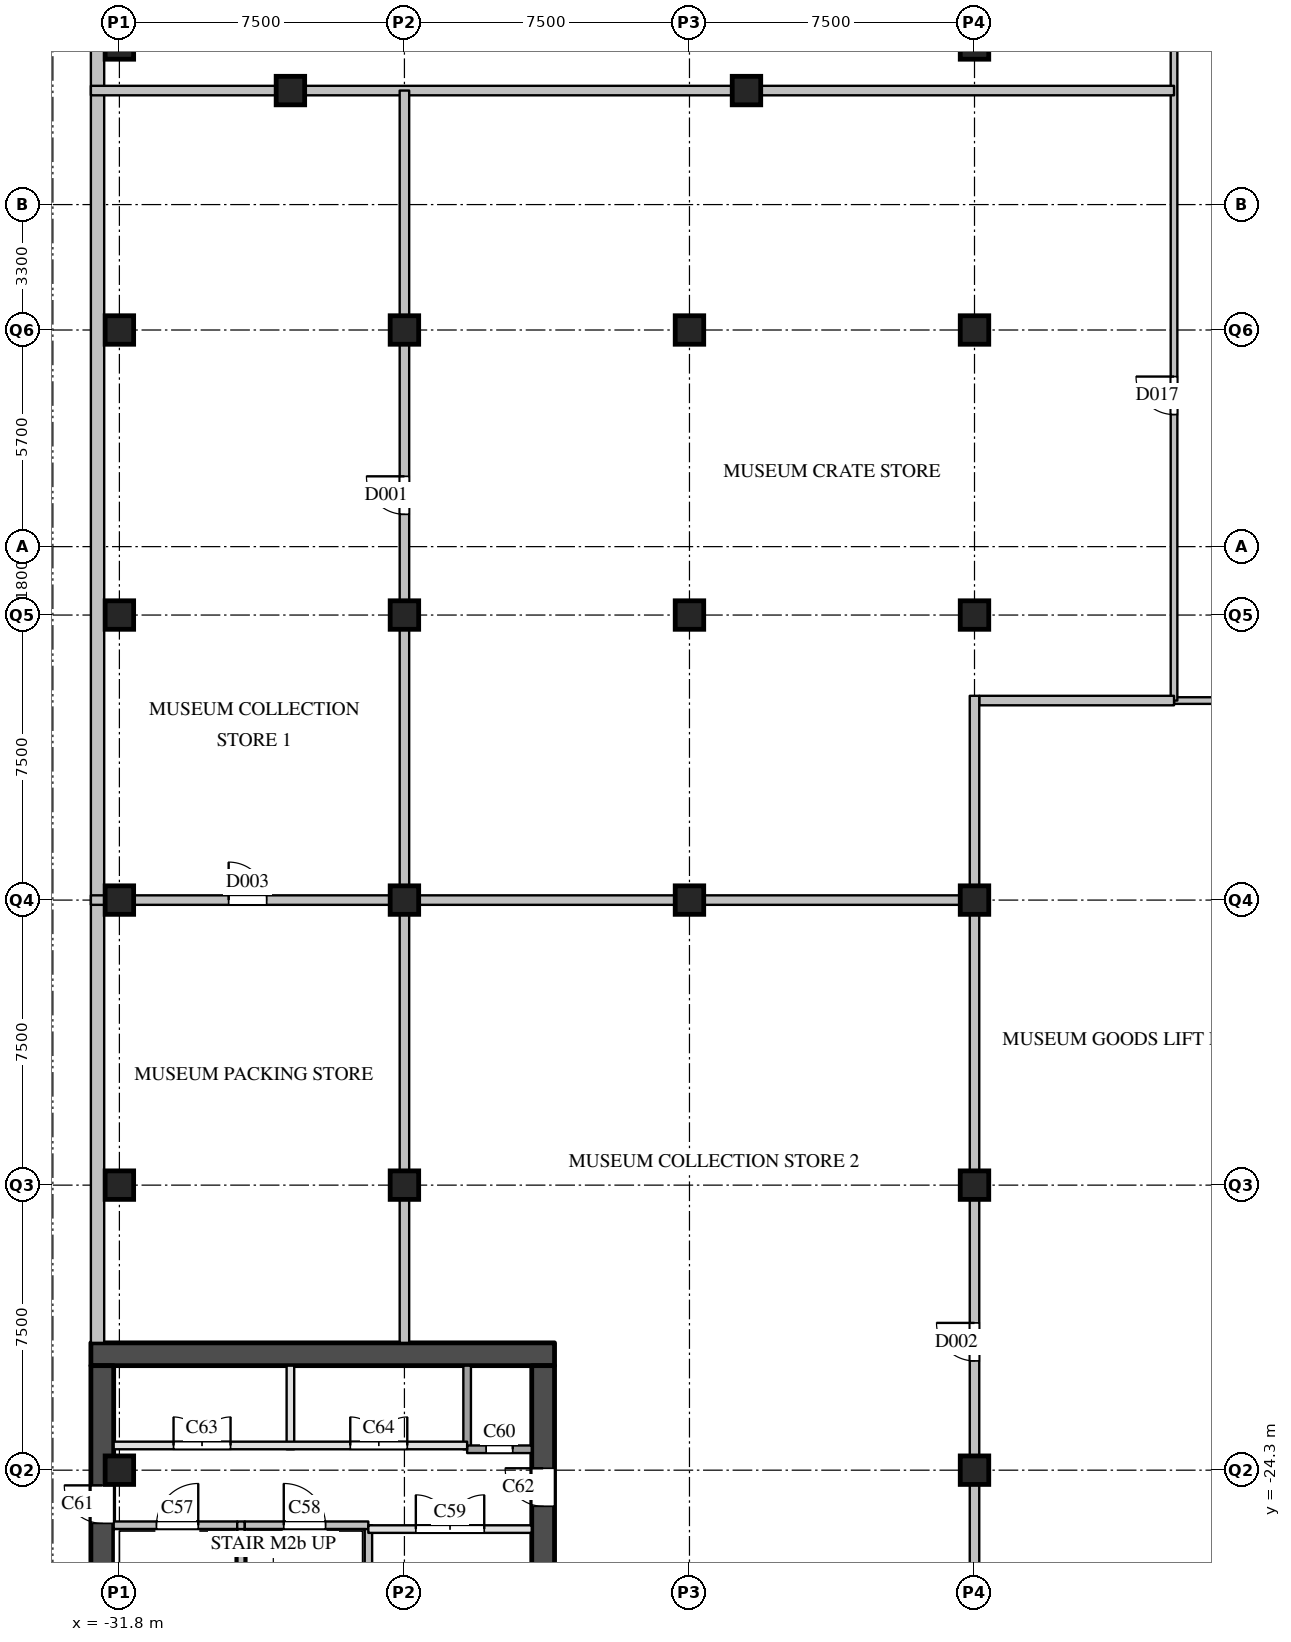
"""IFC4 building model, lengths in metres.
Left out: names, types, materials, properties, quantities, classifications, styles, units other than length and angle.
Written with IfcOpenShell. Run it as: python <this file> out.ifc"""

import sys

from ifc_helpers import new_model, si_unit, direction, frame, frame_2d, origin, origin_2d, place, context, subcontext, project, spatial, rectangle, extrude, element, fill, save


model = new_model("IFC4")
c1 = context("Model", 3, precision=1e-05, world=origin(), true_north=direction((0.0, 1.0)))
c2 = subcontext(c1, "Body", "Model", "MODEL_VIEW")
j1 = project(units=[si_unit("LENGTHUNIT", "METRE"), si_unit("PLANEANGLEUNIT", "RADIAN")], contexts=[c1])
p1 = place(None, origin())
s1 = spatial("IfcSite", under=j1, at=p1, CompositionType="ELEMENT")
p2 = place(p1, origin())
s2 = spatial("IfcBuilding", under=s1, at=p2, CompositionType="ELEMENT")
p3 = place(p2, frame((0.0, 0.0, -6.0)))
s3 = spatial("IfcBuildingStorey", under=s2, at=p3, CompositionType="ELEMENT", Elevation=-6.0)
p4 = place(p3, frame((-32.375, -20.95, 0.0), z_axis=(0.0, 0.0, 1.0), x_axis=(0.0, 1.0, 0.0)))
e1 = element("IfcWall", 1, at=p4, inside=s3, PredefinedType="SOLIDWALL", context=c2, shape_type="SweptSolid", body=[
    extrude(rectangle(XDim=68.3, YDim=0.35, at=frame_2d((34.15, 0.0))), origin(), (0.0, 0.0, 1.0), 5.59),
])
for number, where, z_axis, x_axis in (
    (2, (-31.8, -24.3, 0.0), (0.0, 0.0, 1.0), (1.0, 0.0, 0.0)),
    (3, (-31.8, -16.8, 0.0), (0.0, 0.0, 1.0), (1.0, 0.0, 0.0)),
    (4, (-31.8, -9.3, 0.0), (0.0, 0.0, 1.0), (1.0, 0.0, 0.0)),
    (5, (-31.8, -1.8, 0.0), (0.0, 0.0, 1.0), (1.0, 0.0, 0.0)),
    (6, (-31.8, 5.7, 0.0), (0.0, 0.0, 1.0), (1.0, 0.0, 0.0)),
    (7, (-31.8, 13.2, 0.0), (0.0, 0.0, 1.0), (1.0, 0.0, 0.0)),
    (8, (-24.3, -16.8, 0.0), (0.0, 0.0, 1.0), (1.0, 0.0, 0.0)),
    (9, (-24.3, -9.3, 0.0), (0.0, 0.0, 1.0), (1.0, 0.0, 0.0)),
    (10, (-24.3, -1.8, 0.0), (0.0, 0.0, 1.0), (1.0, 0.0, 0.0)),
    (11, (-24.3, 5.7, 0.0), (0.0, 0.0, 1.0), (1.0, 0.0, 0.0)),
    (12, (-16.8, -9.3, 0.0), (0.0, 0.0, 1.0), (1.0, 0.0, 0.0)),
    (13, (-16.8, -1.8, 0.0), (0.0, 0.0, 1.0), (1.0, 0.0, 0.0)),
    (14, (-16.8, 5.7, 0.0), (0.0, 0.0, 1.0), (1.0, 0.0, 0.0)),
    (15, (-9.3, -24.3, 0.0), (0.0, 0.0, 1.0), (1.0, 0.0, 0.0)),
    (16, (-9.3, -16.8, 0.0), (0.0, 0.0, 1.0), (1.0, 0.0, 0.0)),
    (17, (-9.3, -9.3, 0.0), (0.0, 0.0, 1.0), (1.0, 0.0, 0.0)),
    (18, (-9.3, -1.8, 0.0), (0.0, 0.0, 1.0), (1.0, 0.0, 0.0)),
    (19, (-9.3, 5.7, 0.0), (0.0, 0.0, 1.0), (1.0, 0.0, 0.0)),
    (20, (-9.3, 13.2, 0.0), (0.0, 0.0, 1.0), (1.0, 0.0, 0.0)),
    (21, (-27.3, 12.0, 0.0), (0.0, 0.0, 1.0), (1.0, 0.0, 0.0)),
    (22, (-15.3, 12.0, 0.0), (0.0, 0.0, 1.0), (1.0, 0.0, 0.0)),
):
    element("IfcColumn", number, at=place(p3, frame(where, z_axis=z_axis, x_axis=x_axis)), inside=s3, PredefinedType="COLUMN", context=c2, shape_type="SweptSolid", body=[
        extrude(rectangle(XDim=0.75, YDim=0.75, at=origin_2d()), origin(), (0.0, 0.0, 1.0), 6.0),
    ])
p5 = place(p3, frame((-32.55, -21.25, 0.0), z_axis=(0.0, 0.0, 1.0), x_axis=(1.0, 0.0, 0.0)))
e23 = element("IfcWall", 23, at=p5, inside=s3, PredefinedType="SHEAR", context=c2, shape_type="SweptSolid", body=[
    extrude(rectangle(XDim=12.2, YDim=0.6, at=frame_2d((6.1, 0.0))), origin(), (0.0, 0.0, 1.0), 5.59),
])
p6 = place(p3, frame((-32.25, -31.95, 0.0), z_axis=(0.0, 0.0, 1.0), x_axis=(0.0, 1.0, 0.0)))
e24 = element("IfcWall", 24, at=p6, inside=s3, PredefinedType="SHEAR", context=c2, shape_type="SweptSolid", body=[
    extrude(rectangle(XDim=10.4, YDim=0.6, at=frame_2d((5.2, 0.0))), origin(), (0.0, 0.0, 1.0), 5.59),
])
p7 = place(p6, frame((6.25, 0.0, 0.0)))
e25 = element("IfcOpeningElement", 25, at=p7, cuts=e24, PredefinedType="OPENING", context=c2, shape_type="SweptSolid", body=[
    extrude(rectangle(XDim=1.0, YDim=2.1, at=frame_2d((0.5, 1.05))), frame((0.0, 0.31, 0.0), z_axis=(0.0, -1.0, 0.0), x_axis=(1.0, 0.0, 0.0)), (0.0, 0.0, 1.0), 0.62),
])
p8 = place(p3, frame((-20.65, -31.95, 0.0), z_axis=(0.0, 0.0, 1.0), x_axis=(0.0, 1.0, 0.0)))
e26 = element("IfcWall", 26, at=p8, inside=s3, PredefinedType="SHEAR", context=c2, shape_type="SweptSolid", body=[
    extrude(rectangle(XDim=10.4, YDim=0.6, at=frame_2d((5.2, 0.0))), origin(), (0.0, 0.0, 1.0), 5.59),
])
p9 = place(p8, frame((6.7, 0.0, 0.0)))
e27 = element("IfcOpeningElement", 27, at=p9, cuts=e26, PredefinedType="OPENING", context=c2, shape_type="SweptSolid", body=[
    extrude(rectangle(XDim=1.0, YDim=2.1, at=frame_2d((0.5, 1.05))), frame((0.0, 0.31, 0.0), z_axis=(0.0, -1.0, 0.0), x_axis=(1.0, 0.0, 0.0)), (0.0, 0.0, 1.0), 0.62),
])
p10 = place(p3, frame((-28.6, -27.35, 0.0), z_axis=(0.0, 0.0, 1.0), x_axis=(0.0, 1.0, 0.0)))
e28 = element("IfcWall", 28, at=p10, inside=s3, PredefinedType="SOLIDWALL", context=c2, shape_type="SweptSolid", body=[
    extrude(rectangle(XDim=1.6, YDim=0.2, at=frame_2d((0.8, 0.0))), origin(), (0.0, 0.0, 1.0), 5.59),
])
p11 = place(p3, frame((-27.3, -23.75, 0.0), z_axis=(0.0, 0.0, 1.0), x_axis=(0.0, 1.0, 0.0)))
e29 = element("IfcWall", 29, at=p11, inside=s3, PredefinedType="PARTITIONING", context=c2, shape_type="SweptSolid", body=[
    extrude(rectangle(XDim=2.2, YDim=0.2, at=frame_2d((1.1, 0.0))), origin(), (0.0, 0.0, 1.0), 5.59),
])
p12 = place(p3, frame((-25.25, -27.35, 0.0), z_axis=(0.0, 0.0, 1.0), x_axis=(0.0, 1.0, 0.0)))
e30 = element("IfcWall", 30, at=p12, inside=s3, PredefinedType="SOLIDWALL", context=c2, shape_type="SweptSolid", body=[
    extrude(rectangle(XDim=1.6, YDim=0.2, at=frame_2d((0.8, 0.0))), origin(), (0.0, 0.0, 1.0), 5.59),
])
p13 = place(p3, frame((-22.65, -23.75, 0.0), z_axis=(0.0, 0.0, 1.0), x_axis=(0.0, 1.0, 0.0)))
e31 = element("IfcWall", 31, at=p13, inside=s3, PredefinedType="SOLIDWALL", context=c2, shape_type="SweptSolid", body=[
    extrude(rectangle(XDim=2.2, YDim=0.2, at=frame_2d((1.1, 0.0))), origin(), (0.0, 0.0, 1.0), 5.59),
])
p14 = place(p3, frame((-25.25, -25.85, 0.0), z_axis=(0.0, 0.0, 1.0), x_axis=(1.0, 0.0, 0.0)))
e32 = element("IfcWall", 32, at=p14, inside=s3, PredefinedType="PARTITIONING", context=c2, shape_type="SweptSolid", body=[
    extrude(rectangle(XDim=4.3, YDim=0.2, at=frame_2d((2.15, 0.0))), origin(), (0.0, 0.0, 1.0), 5.59),
])
p15 = place(p14, frame((1.25, 0.0, 0.0)))
e33 = element("IfcOpeningElement", 33, at=p15, cuts=e32, PredefinedType="OPENING", context=c2, shape_type="SweptSolid", body=[
    extrude(rectangle(XDim=1.8, YDim=2.1, at=frame_2d((0.9, 1.05))), frame((0.0, 0.11, 0.0), z_axis=(0.0, -1.0, 0.0), x_axis=(1.0, 0.0, 0.0)), (0.0, 0.0, 1.0), 0.22),
])
p16 = place(p3, frame((-31.95, -25.75, 0.0), z_axis=(0.0, 0.0, 1.0), x_axis=(1.0, 0.0, 0.0)))
e34 = element("IfcWall", 34, at=p16, inside=s3, PredefinedType="SOLIDWALL", context=c2, shape_type="SweptSolid", body=[
    extrude(rectangle(XDim=3.25, YDim=0.2, at=frame_2d((1.625, 0.0))), origin(), (0.0, 0.0, 1.0), 5.59),
])
p17 = place(p16, frame((1.125, 0.0, 0.0)))
e35 = element("IfcOpeningElement", 35, at=p17, cuts=e34, PredefinedType="OPENING", context=c2, shape_type="SweptSolid", body=[
    extrude(rectangle(XDim=1.1, YDim=2.1, at=frame_2d((0.55, 1.05))), frame((0.0, 0.11, 0.0), z_axis=(0.0, -1.0, 0.0), x_axis=(1.0, 0.0, 0.0)), (0.0, 0.0, 1.0), 0.22),
])
p18 = place(p3, frame((-28.7, -25.75, 0.0), z_axis=(0.0, 0.0, 1.0), x_axis=(1.0, 0.0, 0.0)))
e36 = element("IfcWall", 36, at=p18, inside=s3, PredefinedType="SOLIDWALL", context=c2, shape_type="SweptSolid", body=[
    extrude(rectangle(XDim=0.2, YDim=0.2, at=frame_2d((0.1, 0.0))), origin(), (0.0, 0.0, 1.0), 5.59),
])
p19 = place(p3, frame((-28.5, -25.75, 0.0), z_axis=(0.0, 0.0, 1.0), x_axis=(1.0, 0.0, 0.0)))
e37 = element("IfcWall", 37, at=p19, inside=s3, PredefinedType="SOLIDWALL", context=c2, shape_type="SweptSolid", body=[
    extrude(rectangle(XDim=3.25, YDim=0.2, at=frame_2d((1.625, 0.0))), origin(), (0.0, 0.0, 1.0), 5.59),
])
p20 = place(p19, frame((1.025, 0.0, 0.0)))
e38 = element("IfcOpeningElement", 38, at=p20, cuts=e37, PredefinedType="OPENING", context=c2, shape_type="SweptSolid", body=[
    extrude(rectangle(XDim=1.1, YDim=2.1, at=frame_2d((0.55, 1.05))), frame((0.0, 0.11, 0.0), z_axis=(0.0, -1.0, 0.0), x_axis=(1.0, 0.0, 0.0)), (0.0, 0.0, 1.0), 0.22),
])
p21 = place(p3, frame((-31.95, -23.65, 0.0), z_axis=(0.0, 0.0, 1.0), x_axis=(1.0, 0.0, 0.0)))
e39 = element("IfcWall", 39, at=p21, inside=s3, PredefinedType="PARTITIONING", context=c2, shape_type="SweptSolid", body=[
    extrude(rectangle(XDim=9.3, YDim=0.2, at=frame_2d((4.65, 0.0))), origin(), (0.0, 0.0, 1.0), 5.59),
])
p22 = place(p21, frame((1.575, 0.0, 0.0)))
e40 = element("IfcOpeningElement", 40, at=p22, cuts=e39, PredefinedType="OPENING", context=c2, shape_type="SweptSolid", body=[
    extrude(rectangle(XDim=1.5, YDim=2.1, at=frame_2d((0.75, 1.05))), frame((0.0, 0.11, 0.0), z_axis=(0.0, -1.0, 0.0), x_axis=(1.0, 0.0, 0.0)), (0.0, 0.0, 1.0), 0.22),
])
p23 = place(p21, frame((6.225, 0.0, 0.0)))
e41 = element("IfcOpeningElement", 41, at=p23, cuts=e39, PredefinedType="OPENING", context=c2, shape_type="SweptSolid", body=[
    extrude(rectangle(XDim=1.5, YDim=2.1, at=frame_2d((0.75, 1.05))), frame((0.0, 0.11, 0.0), z_axis=(0.0, -1.0, 0.0), x_axis=(1.0, 0.0, 0.0)), (0.0, 0.0, 1.0), 0.22),
])
p24 = place(p3, frame((-22.65, -23.75, 0.0), z_axis=(0.0, 0.0, 1.0), x_axis=(1.0, 0.0, 0.0)))
e42 = element("IfcWall", 42, at=p24, inside=s3, PredefinedType="SOLIDWALL", context=c2, shape_type="SweptSolid", body=[
    extrude(rectangle(XDim=1.7, YDim=0.2, at=frame_2d((0.85, 0.0))), origin(), (0.0, 0.0, 1.0), 5.59),
])
p25 = place(p24, frame((0.5, 0.0, 0.0)))
e43 = element("IfcOpeningElement", 43, at=p25, cuts=e42, PredefinedType="OPENING", context=c2, shape_type="SweptSolid", body=[
    extrude(rectangle(XDim=0.7, YDim=2.1, at=frame_2d((0.35, 1.05))), frame((0.0, 0.11, 0.0), z_axis=(0.0, -1.0, 0.0), x_axis=(1.0, 0.0, 0.0)), (0.0, 0.0, 1.0), 0.22),
])
p26 = place(p3, frame((-4.05, -4.05, 0.0), z_axis=(0.0, 0.0, 1.0), x_axis=(1.0, 0.0, 0.0)))
e44 = element("IfcWall", 44, at=p26, inside=s3, PredefinedType="PARTITIONING", context=c2, shape_type="SweptSolid", body=[
    extrude(rectangle(XDim=18.0, YDim=0.175, at=frame_2d((9.0, 0.0))), origin(), (0.0, 0.0, 1.0), 4.79),
])
p27 = place(p26, frame((8.5, 0.0, 0.0)))
e45 = element("IfcOpeningElement", 45, at=p27, cuts=e44, PredefinedType="OPENING", context=c2, shape_type="SweptSolid", body=[
    extrude(rectangle(XDim=1.0, YDim=2.1, at=frame_2d((0.5, 1.05))), frame((0.0, 0.097, 0.0), z_axis=(0.0, -1.0, 0.0), x_axis=(1.0, 0.0, 0.0)), (0.0, 0.0, 1.0), 0.195),
])
p28 = place(p3, frame((-4.05, -4.05, 0.0), z_axis=(0.0, 0.0, 1.0), x_axis=(0.0, 1.0, 0.0)))
e46 = element("IfcWall", 46, at=p28, inside=s3, PredefinedType="PARTITIONING", context=c2, shape_type="SweptSolid", body=[
    extrude(rectangle(XDim=34.05, YDim=0.175, at=frame_2d((17.025, 0.0))), origin(), (0.0, 0.0, 1.0), 4.79),
])
p29 = place(p28, frame((24.55, 0.0, 0.0)))
e47 = element("IfcOpeningElement", 47, at=p29, cuts=e46, PredefinedType="OPENING", context=c2, shape_type="SweptSolid", body=[
    extrude(rectangle(XDim=1.0, YDim=2.1, at=frame_2d((0.5, 1.05))), frame((0.0, 0.097, 0.0), z_axis=(0.0, -1.0, 0.0), x_axis=(1.0, 0.0, 0.0)), (0.0, 0.0, 1.0), 0.195),
])
p30 = place(p28, frame((7.525, 0.0, 0.0)))
e48 = element("IfcOpeningElement", 48, at=p30, cuts=e46, PredefinedType="OPENING", context=c2, shape_type="SweptSolid", body=[
    extrude(rectangle(XDim=1.0, YDim=2.1, at=frame_2d((0.5, 1.05))), frame((0.0, 0.097, 0.0), z_axis=(0.0, -1.0, 0.0), x_axis=(1.0, 0.0, 0.0)), (0.0, 0.0, 1.0), 0.195),
])
p31 = place(p3, frame((-32.55, -9.3, 0.0), z_axis=(0.0, 0.0, 1.0), x_axis=(1.0, 0.0, 0.0)))
e49 = element("IfcWall", 49, at=p31, inside=s3, PredefinedType="PARTITIONING", context=c2, shape_type="SweptSolid", body=[
    extrude(rectangle(XDim=23.25, YDim=0.25, at=frame_2d((11.625, 0.0))), origin(), (0.0, 0.0, 1.0), 4.79),
])
p32 = place(p31, frame((3.625, 0.0, 0.0)))
e50 = element("IfcOpeningElement", 50, at=p32, cuts=e49, PredefinedType="OPENING", context=c2, shape_type="SweptSolid", body=[
    extrude(rectangle(XDim=1.0, YDim=2.1, at=frame_2d((0.5, 1.05))), frame((0.0, 0.135, 0.0), z_axis=(0.0, -1.0, 0.0), x_axis=(1.0, 0.0, 0.0)), (0.0, 0.0, 1.0), 0.27),
])
p33 = place(p3, frame((-9.175, -4.05, 0.0), z_axis=(0.0, 0.0, 1.0), x_axis=(1.0, 0.0, 0.0)))
e51 = element("IfcWall", 51, at=p33, inside=s3, PredefinedType="PARTITIONING", context=c2, shape_type="SweptSolid", body=[
    extrude(rectangle(XDim=5.125, YDim=0.25, at=frame_2d((2.562, 0.0))), origin(), (0.0, 0.0, 1.0), 4.79),
])
p34 = place(p3, frame((-32.55, 12.0, 0.0), z_axis=(0.0, 0.0, 1.0), x_axis=(1.0, 0.0, 0.0)))
e52 = element("IfcWall", 52, at=p34, inside=s3, PredefinedType="PARTITIONING", context=c2, shape_type="SweptSolid", body=[
    extrude(rectangle(XDim=28.5, YDim=0.25, at=frame_2d((14.25, 0.0))), origin(), (0.0, 0.0, 1.0), 4.79),
])
p35 = place(p3, frame((-24.3, -20.95, 0.0), z_axis=(0.0, 0.0, 1.0), x_axis=(0.0, 1.0, 0.0)))
e53 = element("IfcWall", 53, at=p35, inside=s3, PredefinedType="PARTITIONING", context=c2, shape_type="SweptSolid", body=[
    extrude(rectangle(XDim=32.95, YDim=0.25, at=frame_2d((16.475, 0.0))), origin(), (0.0, 0.0, 1.0), 4.79),
])
p36 = place(p35, frame((21.8, 0.0, 0.0)))
e54 = element("IfcOpeningElement", 54, at=p36, cuts=e53, PredefinedType="OPENING", context=c2, shape_type="SweptSolid", body=[
    extrude(rectangle(XDim=1.0, YDim=2.1, at=frame_2d((0.5, 1.05))), frame((0.0, 0.135, 0.0), z_axis=(0.0, -1.0, 0.0), x_axis=(1.0, 0.0, 0.0)), (0.0, 0.0, 1.0), 0.27),
])
p37 = place(p3, frame((-9.3, -32.55, 0.0), z_axis=(0.0, 0.0, 1.0), x_axis=(0.0, 1.0, 0.0)))
e55 = element("IfcWall", 55, at=p37, inside=s3, PredefinedType="PARTITIONING", context=c2, shape_type="SweptSolid", body=[
    extrude(rectangle(XDim=28.625, YDim=0.25, at=frame_2d((14.312, 0.0))), origin(), (0.0, 0.0, 1.0), 4.79),
])
p38 = place(p37, frame((11.125, 0.0, 0.0)))
e56 = element("IfcOpeningElement", 56, at=p38, cuts=e55, PredefinedType="OPENING", context=c2, shape_type="SweptSolid", body=[
    extrude(rectangle(XDim=1.0, YDim=2.1, at=frame_2d((0.5, 1.05))), frame((0.0, 0.135, 0.0), z_axis=(0.0, -1.0, 0.0), x_axis=(1.0, 0.0, 0.0)), (0.0, 0.0, 1.0), 0.27),
])
p39 = place(p17, origin())
e57 = element("IfcDoor", 57, at=p39, inside=s3, OperationType="SINGLE_SWING_RIGHT", PredefinedType="DOOR", context=c2, shape_type="SweptSolid", body=[
    extrude(rectangle(XDim=1.1, YDim=2.1, at=frame_2d((0.55, 1.05))), frame((0.0, 0.025, 0.0), z_axis=(0.0, -1.0, 0.0), x_axis=(1.0, 0.0, 0.0)), (0.0, 0.0, 1.0), 0.05),
])
fill(e35, e57)
p40 = place(p20, origin())
e58 = element("IfcDoor", 58, at=p40, inside=s3, OperationType="SINGLE_SWING_LEFT", PredefinedType="DOOR", context=c2, shape_type="SweptSolid", body=[
    extrude(rectangle(XDim=1.1, YDim=2.1, at=frame_2d((0.55, 1.05))), frame((0.0, 0.025, 0.0), z_axis=(0.0, -1.0, 0.0), x_axis=(1.0, 0.0, 0.0)), (0.0, 0.0, 1.0), 0.05),
])
fill(e38, e58)
p41 = place(p15, origin())
e59 = element("IfcDoor", 59, at=p41, inside=s3, OperationType="DOUBLE_DOOR_SINGLE_SWING", PredefinedType="DOOR", context=c2, shape_type="SweptSolid", body=[
    extrude(rectangle(XDim=1.8, YDim=2.1, at=frame_2d((0.9, 1.05))), frame((0.0, 0.025, 0.0), z_axis=(0.0, -1.0, 0.0), x_axis=(1.0, 0.0, 0.0)), (0.0, 0.0, 1.0), 0.05),
])
fill(e33, e59)
p42 = place(p25, origin())
e60 = element("IfcDoor", 60, at=p42, inside=s3, OperationType="SINGLE_SWING_RIGHT", PredefinedType="DOOR", context=c2, shape_type="SweptSolid", body=[
    extrude(rectangle(XDim=0.7, YDim=2.1, at=frame_2d((0.35, 1.05))), frame((0.0, 0.025, 0.0), z_axis=(0.0, -1.0, 0.0), x_axis=(1.0, 0.0, 0.0)), (0.0, 0.0, 1.0), 0.05),
])
fill(e43, e60)
p43 = place(p7, origin())
e61 = element("IfcDoor", 61, at=p43, inside=s3, OperationType="SINGLE_SWING_RIGHT", PredefinedType="DOOR", context=c2, shape_type="SweptSolid", body=[
    extrude(rectangle(XDim=1.0, YDim=2.1, at=frame_2d((0.5, 1.05))), frame((0.0, 0.025, 0.0), z_axis=(0.0, -1.0, 0.0), x_axis=(1.0, 0.0, 0.0)), (0.0, 0.0, 1.0), 0.05),
])
fill(e25, e61)
p44 = place(p9, origin())
e62 = element("IfcDoor", 62, at=p44, inside=s3, OperationType="SINGLE_SWING_RIGHT", PredefinedType="DOOR", context=c2, shape_type="SweptSolid", body=[
    extrude(rectangle(XDim=1.0, YDim=2.1, at=frame_2d((0.5, 1.05))), frame((0.0, 0.025, 0.0), z_axis=(0.0, -1.0, 0.0), x_axis=(1.0, 0.0, 0.0)), (0.0, 0.0, 1.0), 0.05),
])
fill(e27, e62)
p45 = place(p22, origin())
e63 = element("IfcDoor", 63, at=p45, inside=s3, OperationType="DOUBLE_DOOR_SINGLE_SWING", PredefinedType="DOOR", context=c2, shape_type="SweptSolid", body=[
    extrude(rectangle(XDim=1.5, YDim=2.1, at=frame_2d((0.75, 1.05))), frame((0.0, 0.025, 0.0), z_axis=(0.0, -1.0, 0.0), x_axis=(1.0, 0.0, 0.0)), (0.0, 0.0, 1.0), 0.05),
])
fill(e40, e63)
p46 = place(p23, origin())
e64 = element("IfcDoor", 64, at=p46, inside=s3, OperationType="DOUBLE_DOOR_SINGLE_SWING", PredefinedType="DOOR", context=c2, shape_type="SweptSolid", body=[
    extrude(rectangle(XDim=1.5, YDim=2.1, at=frame_2d((0.75, 1.05))), frame((0.0, 0.025, 0.0), z_axis=(0.0, -1.0, 0.0), x_axis=(1.0, 0.0, 0.0)), (0.0, 0.0, 1.0), 0.05),
])
fill(e41, e64)
p47 = place(p36, origin())
e65 = element("IfcDoor", 65, at=p47, inside=s3, OperationType="SINGLE_SWING_RIGHT", PredefinedType="DOOR", context=c2, shape_type="SweptSolid", body=[
    extrude(rectangle(XDim=1.0, YDim=2.1, at=frame_2d((0.5, 1.05))), frame((0.0, 0.025, 0.0), z_axis=(0.0, -1.0, 0.0), x_axis=(1.0, 0.0, 0.0)), (0.0, 0.0, 1.0), 0.05),
])
fill(e54, e65)
p48 = place(p38, origin())
e66 = element("IfcDoor", 66, at=p48, inside=s3, OperationType="SINGLE_SWING_RIGHT", PredefinedType="DOOR", context=c2, shape_type="SweptSolid", body=[
    extrude(rectangle(XDim=1.0, YDim=2.1, at=frame_2d((0.5, 1.05))), frame((0.0, 0.025, 0.0), z_axis=(0.0, -1.0, 0.0), x_axis=(1.0, 0.0, 0.0)), (0.0, 0.0, 1.0), 0.05),
])
fill(e56, e66)
p49 = place(p32, origin())
e67 = element("IfcDoor", 67, at=p49, inside=s3, OperationType="SINGLE_SWING_LEFT", PredefinedType="DOOR", context=c2, shape_type="SweptSolid", body=[
    extrude(rectangle(XDim=1.0, YDim=2.1, at=frame_2d((0.5, 1.05))), frame((0.0, 0.025, 0.0), z_axis=(0.0, -1.0, 0.0), x_axis=(1.0, 0.0, 0.0)), (0.0, 0.0, 1.0), 0.05),
])
fill(e50, e67)
p50 = place(p30, origin())
e68 = element("IfcDoor", 68, at=p50, inside=s3, OperationType="SINGLE_SWING_RIGHT", PredefinedType="DOOR", context=c2, shape_type="SweptSolid", body=[
    extrude(rectangle(XDim=1.0, YDim=2.1, at=frame_2d((0.5, 1.05))), frame((0.0, 0.025, 0.0), z_axis=(0.0, -1.0, 0.0), x_axis=(1.0, 0.0, 0.0)), (0.0, 0.0, 1.0), 0.05),
])
fill(e48, e68)
save(model, sys.argv[1])
